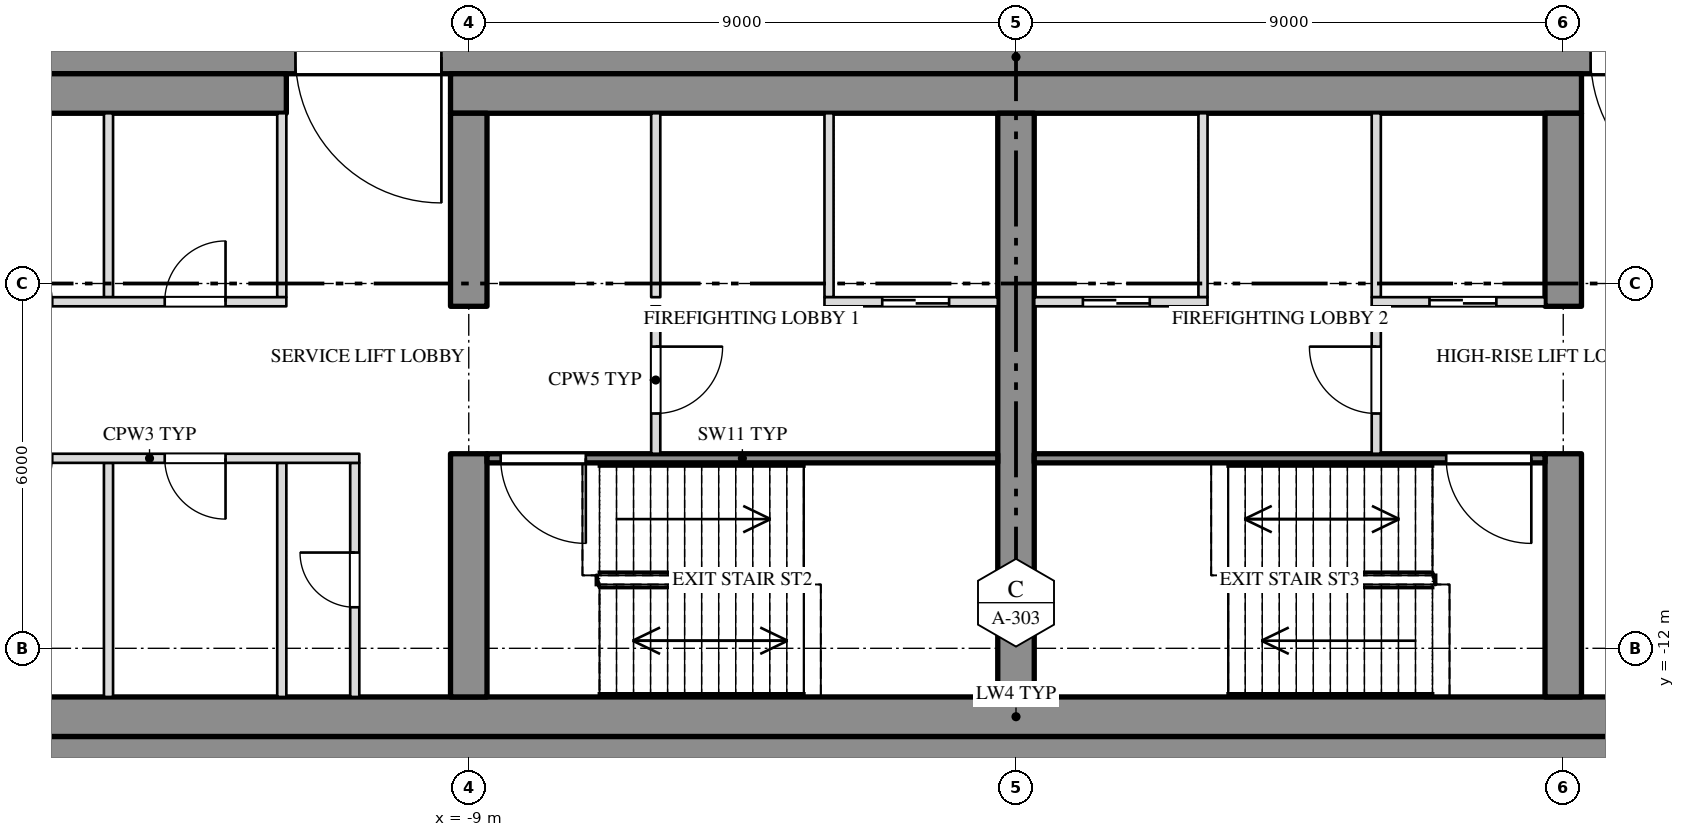
"""IFC4 building model, lengths in metres.
Left out: names, types, materials, properties, quantities, classifications, styles, units other than length and angle.
Written with IfcOpenShell. Run it as: python <this file> out.ifc"""

import sys

from ifc_helpers import new_model, si_unit, direction, frame, frame_2d, origin, place, context, subcontext, project, spatial, rectangle, extrude, element, fill, save


model = new_model("IFC4")
c1 = context("Model", 3, precision=1e-05, world=origin(), true_north=direction((0.0, 1.0)))
c2 = subcontext(c1, "Body", "Model", "MODEL_VIEW")
j1 = project(units=[si_unit("LENGTHUNIT", "METRE"), si_unit("PLANEANGLEUNIT", "RADIAN")], contexts=[c1])
p1 = place(None, origin())
s1 = spatial("IfcSite", under=j1, at=p1, CompositionType="ELEMENT")
p2 = place(p1, origin())
s2 = spatial("IfcBuilding", under=s1, at=p2, CompositionType="ELEMENT")
p3 = place(p2, frame((0.0, 0.0, 272.5)))
s3 = spatial("IfcBuildingStorey", under=s2, at=p3, CompositionType="ELEMENT", Elevation=272.5)
p4 = place(p3, frame((-27.0, -2.275, 0.0), z_axis=(0.0, 0.0, 1.0), x_axis=(1.0, 0.0, 0.0)))
e1 = element("IfcWall", 1, at=p4, inside=s3, PredefinedType="SHEAR", context=c2, shape_type="SweptSolid", body=[
    extrude(rectangle(XDim=54.0, YDim=0.55, at=frame_2d((27.0, 0.0))), origin(), (0.0, 0.0, 1.0), 3.78),
])
p5 = place(p4, frame((15.15, 0.0, 0.0)))
e2 = element("IfcOpeningElement", 2, at=p5, cuts=e1, PredefinedType="OPENING", context=c2, shape_type="SweptSolid", body=[
    extrude(rectangle(XDim=2.4, YDim=2.1, at=frame_2d((1.2, 1.05))), frame((0.0, 0.287, 0.0), z_axis=(0.0, -1.0, 0.0), x_axis=(1.0, 0.0, 0.0)), (0.0, 0.0, 1.0), 0.574),
])
p6 = place(p4, frame((36.45, 0.0, 0.0)))
e3 = element("IfcOpeningElement", 3, at=p6, cuts=e1, PredefinedType="OPENING", context=c2, shape_type="SweptSolid", body=[
    extrude(rectangle(XDim=2.4, YDim=2.1, at=frame_2d((1.2, 1.05))), frame((0.0, 0.287, 0.0), z_axis=(0.0, -1.0, 0.0), x_axis=(1.0, 0.0, 0.0)), (0.0, 0.0, 1.0), 0.574),
])
p7 = place(p3, frame((-27.0, -13.725, 0.0), z_axis=(0.0, 0.0, 1.0), x_axis=(1.0, 0.0, 0.0)))
e4 = element("IfcWall", 4, at=p7, inside=s3, PredefinedType="SHEAR", context=c2, shape_type="SweptSolid", body=[
    extrude(rectangle(XDim=54.0, YDim=0.55, at=frame_2d((27.0, 0.0))), origin(), (0.0, 0.0, 1.0), 3.78),
])
p8 = place(p3, frame((-26.45, -2.875, 0.0), z_axis=(0.0, 0.0, 1.0), x_axis=(1.0, 0.0, 0.0)))
e5 = element("IfcWall", 5, at=p8, inside=s3, PredefinedType="SHEAR", context=c2, shape_type="SweptSolid", body=[
    extrude(rectangle(XDim=14.45, YDim=0.65, at=frame_2d((7.225, 0.0))), origin(), (0.0, 0.0, 1.0), 3.78),
])
p9 = place(p3, frame((-9.3, -2.875, 0.0), z_axis=(0.0, 0.0, 1.0), x_axis=(1.0, 0.0, 0.0)))
e6 = element("IfcWall", 6, at=p9, inside=s3, PredefinedType="SHEAR", context=c2, shape_type="SweptSolid", body=[
    extrude(rectangle(XDim=18.6, YDim=0.65, at=frame_2d((9.3, 0.0))), origin(), (0.0, 0.0, 1.0), 3.78),
])
p10 = place(p3, frame((-26.45, -13.125, 0.0), z_axis=(0.0, 0.0, 1.0), x_axis=(1.0, 0.0, 0.0)))
e7 = element("IfcWall", 7, at=p10, inside=s3, PredefinedType="SHEAR", context=c2, shape_type="SweptSolid", body=[
    extrude(rectangle(XDim=52.9, YDim=0.65, at=frame_2d((26.45, 0.0))), origin(), (0.0, 0.0, 1.0), 3.78),
])
p11 = place(p3, frame((-9.0, -12.8, 0.0), z_axis=(0.0, 0.0, 1.0), x_axis=(0.0, 1.0, 0.0)))
e8 = element("IfcWall", 8, at=p11, inside=s3, PredefinedType="SHEAR", context=c2, shape_type="SweptSolid", body=[
    extrude(rectangle(XDim=4.0, YDim=0.6, at=frame_2d((2.0, 0.0))), origin(), (0.0, 0.0, 1.0), 3.78),
])
p12 = place(p3, frame((-9.0, -6.375, 0.0), z_axis=(0.0, 0.0, 1.0), x_axis=(0.0, 1.0, 0.0)))
e9 = element("IfcWall", 9, at=p12, inside=s3, PredefinedType="SHEAR", context=c2, shape_type="SweptSolid", body=[
    extrude(rectangle(XDim=3.175, YDim=0.6, at=frame_2d((1.587, 0.0))), origin(), (0.0, 0.0, 1.0), 3.78),
])
p13 = place(p3, frame((0.0, -12.8, 0.0), z_axis=(0.0, 0.0, 1.0), x_axis=(0.0, 1.0, 0.0)))
e10 = element("IfcWall", 10, at=p13, inside=s3, PredefinedType="SHEAR", context=c2, shape_type="SweptSolid", body=[
    extrude(rectangle(XDim=9.6, YDim=0.6, at=frame_2d((4.8, 0.0))), origin(), (0.0, 0.0, 1.0), 3.78),
])
p14 = place(p3, frame((9.0, -12.8, 0.0), z_axis=(0.0, 0.0, 1.0), x_axis=(0.0, 1.0, 0.0)))
e11 = element("IfcWall", 11, at=p14, inside=s3, PredefinedType="SHEAR", context=c2, shape_type="SweptSolid", body=[
    extrude(rectangle(XDim=4.0, YDim=0.6, at=frame_2d((2.0, 0.0))), origin(), (0.0, 0.0, 1.0), 3.78),
])
p15 = place(p3, frame((9.0, -6.375, 0.0), z_axis=(0.0, 0.0, 1.0), x_axis=(0.0, 1.0, 0.0)))
e12 = element("IfcWall", 12, at=p15, inside=s3, PredefinedType="SHEAR", context=c2, shape_type="SweptSolid", body=[
    extrude(rectangle(XDim=3.175, YDim=0.6, at=frame_2d((1.587, 0.0))), origin(), (0.0, 0.0, 1.0), 3.78),
])
for number, where, z_axis, x_axis in (
    (13, (-12.075, -6.225, 0.0), (0.0, 0.0, 1.0), (0.0, 1.0, 0.0)),
    (14, (-14.925, -6.225, 0.0), (0.0, 0.0, 1.0), (0.0, 1.0, 0.0)),
    (15, (-3.075, -6.225, 0.0), (0.0, 0.0, 1.0), (0.0, 1.0, 0.0)),
    (16, (-5.925, -6.225, 0.0), (0.0, 0.0, 1.0), (0.0, 1.0, 0.0)),
    (17, (3.075, -6.225, 0.0), (0.0, 0.0, 1.0), (0.0, 1.0, 0.0)),
    (18, (5.925, -6.225, 0.0), (0.0, 0.0, 1.0), (0.0, 1.0, 0.0)),
):
    element("IfcWall", number, at=place(p3, frame(where, z_axis=z_axis, x_axis=x_axis)), inside=s3, PredefinedType="PARTITIONING", context=c2, shape_type="SweptSolid", body=[
        extrude(rectangle(XDim=3.025, YDim=0.15, at=frame_2d((1.513, 0.0))), origin(), (0.0, 0.0, 1.0), 3.78),
    ])
p16 = place(p3, frame((-10.875, -12.8, 0.0), z_axis=(0.0, 0.0, 1.0), x_axis=(0.0, 1.0, 0.0)))
e19 = element("IfcWall", 19, at=p16, inside=s3, PredefinedType="PARTITIONING", context=c2, shape_type="SweptSolid", body=[
    extrude(rectangle(XDim=3.85, YDim=0.15, at=frame_2d((1.925, 0.0))), origin(), (0.0, 0.0, 1.0), 3.78),
])
p17 = place(p16, frame((1.475, 0.0, 0.0)))
e20 = element("IfcOpeningElement", 20, at=p17, cuts=e19, PredefinedType="OPENING", context=c2, shape_type="SweptSolid", body=[
    extrude(rectangle(XDim=0.9, YDim=2.1, at=frame_2d((0.45, 1.05))), frame((0.0, 0.087, 0.0), z_axis=(0.0, -1.0, 0.0), x_axis=(1.0, 0.0, 0.0)), (0.0, 0.0, 1.0), 0.174),
])
for number, where, z_axis, x_axis in (
    (21, (-12.075, -12.8, 0.0), (0.0, 0.0, 1.0), (0.0, 1.0, 0.0)),
    (22, (-14.925, -12.8, 0.0), (0.0, 0.0, 1.0), (0.0, 1.0, 0.0)),
):
    element("IfcWall", number, at=place(p3, frame(where, z_axis=z_axis, x_axis=x_axis)), inside=s3, PredefinedType="PARTITIONING", context=c2, shape_type="SweptSolid", body=[
        extrude(rectangle(XDim=3.85, YDim=0.15, at=frame_2d((1.925, 0.0))), origin(), (0.0, 0.0, 1.0), 3.78),
    ])
p18 = place(p3, frame((-5.925, -8.8, 0.0), z_axis=(0.0, 0.0, 1.0), x_axis=(0.0, 1.0, 0.0)))
e23 = element("IfcWall", 23, at=p18, inside=s3, PredefinedType="PARTITIONING", context=c2, shape_type="SweptSolid", body=[
    extrude(rectangle(XDim=2.425, YDim=0.15, at=frame_2d((1.212, 0.0))), origin(), (0.0, 0.0, 1.0), 3.78),
])
p19 = place(p18, frame((0.662, 0.0, 0.0)))
e24 = element("IfcOpeningElement", 24, at=p19, cuts=e23, PredefinedType="OPENING", context=c2, shape_type="SweptSolid", body=[
    extrude(rectangle(XDim=1.1, YDim=2.1, at=frame_2d((0.55, 1.05))), frame((0.0, 0.087, 0.0), z_axis=(0.0, -1.0, 0.0), x_axis=(1.0, 0.0, 0.0)), (0.0, 0.0, 1.0), 0.174),
])
p20 = place(p3, frame((5.925, -8.8, 0.0), z_axis=(0.0, 0.0, 1.0), x_axis=(0.0, 1.0, 0.0)))
e25 = element("IfcWall", 25, at=p20, inside=s3, PredefinedType="PARTITIONING", context=c2, shape_type="SweptSolid", body=[
    extrude(rectangle(XDim=2.425, YDim=0.15, at=frame_2d((1.212, 0.0))), origin(), (0.0, 0.0, 1.0), 3.78),
])
p21 = place(p20, frame((0.662, 0.0, 0.0)))
e26 = element("IfcOpeningElement", 26, at=p21, cuts=e25, PredefinedType="OPENING", context=c2, shape_type="SweptSolid", body=[
    extrude(rectangle(XDim=1.1, YDim=2.1, at=frame_2d((0.55, 1.05))), frame((0.0, 0.087, 0.0), z_axis=(0.0, -1.0, 0.0), x_axis=(1.0, 0.0, 0.0)), (0.0, 0.0, 1.0), 0.174),
])
p22 = place(p3, frame((-17.7, -6.3, 0.0), z_axis=(0.0, 0.0, 1.0), x_axis=(1.0, 0.0, 0.0)))
e27 = element("IfcWall", 27, at=p22, inside=s3, PredefinedType="PARTITIONING", context=c2, shape_type="SweptSolid", body=[
    extrude(rectangle(XDim=5.7, YDim=0.15, at=frame_2d((2.85, 0.0))), origin(), (0.0, 0.0, 1.0), 3.78),
])
p23 = place(p22, frame((0.85, 0.0, 0.0)))
e28 = element("IfcOpeningElement", 28, at=p23, cuts=e27, PredefinedType="OPENING", context=c2, shape_type="SweptSolid", body=[
    extrude(rectangle(XDim=1.0, YDim=2.1, at=frame_2d((0.5, 1.05))), frame((0.0, 0.087, 0.0), z_axis=(0.0, -1.0, 0.0), x_axis=(1.0, 0.0, 0.0)), (0.0, 0.0, 1.0), 0.174),
])
p24 = place(p22, frame((3.7, 0.0, 0.0)))
e29 = element("IfcOpeningElement", 29, at=p24, cuts=e27, PredefinedType="OPENING", context=c2, shape_type="SweptSolid", body=[
    extrude(rectangle(XDim=1.0, YDim=2.1, at=frame_2d((0.5, 1.05))), frame((0.0, 0.087, 0.0), z_axis=(0.0, -1.0, 0.0), x_axis=(1.0, 0.0, 0.0)), (0.0, 0.0, 1.0), 0.174),
])
p25 = place(p3, frame((-3.15, -6.3, 0.0), z_axis=(0.0, 0.0, 1.0), x_axis=(1.0, 0.0, 0.0)))
e30 = element("IfcWall", 30, at=p25, inside=s3, PredefinedType="PARTITIONING", context=c2, shape_type="SweptSolid", body=[
    extrude(rectangle(XDim=2.85, YDim=0.15, at=frame_2d((1.425, 0.0))), origin(), (0.0, 0.0, 1.0), 3.78),
])
p26 = place(p25, frame((0.95, 0.0, 0.0)))
e31 = element("IfcOpeningElement", 31, at=p26, cuts=e30, PredefinedType="OPENING", context=c2, shape_type="SweptSolid", body=[
    extrude(rectangle(XDim=1.1, YDim=2.1, at=frame_2d((0.55, 1.05))), frame((0.0, 0.087, 0.0), z_axis=(0.0, -1.0, 0.0), x_axis=(1.0, 0.0, 0.0)), (0.0, 0.0, 1.0), 0.174),
])
p27 = place(p3, frame((0.3, -6.3, 0.0), z_axis=(0.0, 0.0, 1.0), x_axis=(1.0, 0.0, 0.0)))
e32 = element("IfcWall", 32, at=p27, inside=s3, PredefinedType="PARTITIONING", context=c2, shape_type="SweptSolid", body=[
    extrude(rectangle(XDim=2.85, YDim=0.15, at=frame_2d((1.425, 0.0))), origin(), (0.0, 0.0, 1.0), 3.78),
])
p28 = place(p27, frame((0.8, 0.0, 0.0)))
e33 = element("IfcOpeningElement", 33, at=p28, cuts=e32, PredefinedType="OPENING", context=c2, shape_type="SweptSolid", body=[
    extrude(rectangle(XDim=1.1, YDim=2.1, at=frame_2d((0.55, 1.05))), frame((0.0, 0.087, 0.0), z_axis=(0.0, -1.0, 0.0), x_axis=(1.0, 0.0, 0.0)), (0.0, 0.0, 1.0), 0.174),
])
p29 = place(p3, frame((5.85, -6.3, 0.0), z_axis=(0.0, 0.0, 1.0), x_axis=(1.0, 0.0, 0.0)))
e34 = element("IfcWall", 34, at=p29, inside=s3, PredefinedType="PARTITIONING", context=c2, shape_type="SweptSolid", body=[
    extrude(rectangle(XDim=2.85, YDim=0.15, at=frame_2d((1.425, 0.0))), origin(), (0.0, 0.0, 1.0), 3.78),
])
p30 = place(p29, frame((0.95, 0.0, 0.0)))
e35 = element("IfcOpeningElement", 35, at=p30, cuts=e34, PredefinedType="OPENING", context=c2, shape_type="SweptSolid", body=[
    extrude(rectangle(XDim=1.1, YDim=2.1, at=frame_2d((0.55, 1.05))), frame((0.0, 0.087, 0.0), z_axis=(0.0, -1.0, 0.0), x_axis=(1.0, 0.0, 0.0)), (0.0, 0.0, 1.0), 0.174),
])
p31 = place(p3, frame((-17.7, -8.875, 0.0), z_axis=(0.0, 0.0, 1.0), x_axis=(1.0, 0.0, 0.0)))
e36 = element("IfcWall", 36, at=p31, inside=s3, PredefinedType="PARTITIONING", context=c2, shape_type="SweptSolid", body=[
    extrude(rectangle(XDim=6.9, YDim=0.15, at=frame_2d((3.45, 0.0))), origin(), (0.0, 0.0, 1.0), 3.78),
])
p32 = place(p31, frame((0.85, 0.0, 0.0)))
e37 = element("IfcOpeningElement", 37, at=p32, cuts=e36, PredefinedType="OPENING", context=c2, shape_type="SweptSolid", body=[
    extrude(rectangle(XDim=1.0, YDim=2.1, at=frame_2d((0.5, 1.05))), frame((0.0, 0.087, 0.0), z_axis=(0.0, -1.0, 0.0), x_axis=(1.0, 0.0, 0.0)), (0.0, 0.0, 1.0), 0.174),
])
p33 = place(p31, frame((3.7, 0.0, 0.0)))
e38 = element("IfcOpeningElement", 38, at=p33, cuts=e36, PredefinedType="OPENING", context=c2, shape_type="SweptSolid", body=[
    extrude(rectangle(XDim=1.0, YDim=2.1, at=frame_2d((0.5, 1.05))), frame((0.0, 0.087, 0.0), z_axis=(0.0, -1.0, 0.0), x_axis=(1.0, 0.0, 0.0)), (0.0, 0.0, 1.0), 0.174),
])
p34 = place(p3, frame((-8.7, -8.875, 0.0), z_axis=(0.0, 0.0, 1.0), x_axis=(1.0, 0.0, 0.0)))
e39 = element("IfcWall", 39, at=p34, inside=s3, PredefinedType="SHEAR", context=c2, shape_type="SweptSolid", body=[
    extrude(rectangle(XDim=8.4, YDim=0.15, at=frame_2d((4.2, 0.0))), origin(), (0.0, 0.0, 1.0), 3.78),
])
p35 = place(p34, frame((0.225, 0.0, 0.0)))
e40 = element("IfcOpeningElement", 40, at=p35, cuts=e39, PredefinedType="OPENING", context=c2, shape_type="SweptSolid", body=[
    extrude(rectangle(XDim=1.4, YDim=2.1, at=frame_2d((0.7, 1.05))), frame((0.0, 0.087, 0.0), z_axis=(0.0, -1.0, 0.0), x_axis=(1.0, 0.0, 0.0)), (0.0, 0.0, 1.0), 0.174),
])
p36 = place(p3, frame((0.3, -8.875, 0.0), z_axis=(0.0, 0.0, 1.0), x_axis=(1.0, 0.0, 0.0)))
e41 = element("IfcWall", 41, at=p36, inside=s3, PredefinedType="SHEAR", context=c2, shape_type="SweptSolid", body=[
    extrude(rectangle(XDim=8.4, YDim=0.15, at=frame_2d((4.2, 0.0))), origin(), (0.0, 0.0, 1.0), 3.78),
])
p37 = place(p36, frame((6.775, 0.0, 0.0)))
e42 = element("IfcOpeningElement", 42, at=p37, cuts=e41, PredefinedType="OPENING", context=c2, shape_type="SweptSolid", body=[
    extrude(rectangle(XDim=1.4, YDim=2.1, at=frame_2d((0.7, 1.05))), frame((0.0, 0.087, 0.0), z_axis=(0.0, -1.0, 0.0), x_axis=(1.0, 0.0, 0.0)), (0.0, 0.0, 1.0), 0.174),
])
p38 = place(p32, origin())
e43 = element("IfcDoor", 43, at=p38, inside=s3, OperationType="SINGLE_SWING_RIGHT", PredefinedType="DOOR", context=c2, shape_type="SweptSolid", body=[
    extrude(rectangle(XDim=1.0, YDim=2.1, at=frame_2d((0.5, 1.05))), frame((0.0, 0.025, 0.0), z_axis=(0.0, -1.0, 0.0), x_axis=(1.0, 0.0, 0.0)), (0.0, 0.0, 1.0), 0.05),
])
fill(e37, e43)
p39 = place(p23, origin())
e44 = element("IfcDoor", 44, at=p39, inside=s3, OperationType="SINGLE_SWING_LEFT", PredefinedType="DOOR", context=c2, shape_type="SweptSolid", body=[
    extrude(rectangle(XDim=1.0, YDim=2.1, at=frame_2d((0.5, 1.05))), frame((0.0, 0.025, 0.0), z_axis=(0.0, -1.0, 0.0), x_axis=(1.0, 0.0, 0.0)), (0.0, 0.0, 1.0), 0.05),
])
fill(e28, e44)
p40 = place(p33, origin())
e45 = element("IfcDoor", 45, at=p40, inside=s3, OperationType="SINGLE_SWING_LEFT", PredefinedType="DOOR", context=c2, shape_type="SweptSolid", body=[
    extrude(rectangle(XDim=1.0, YDim=2.1, at=frame_2d((0.5, 1.05))), frame((0.0, 0.025, 0.0), z_axis=(0.0, -1.0, 0.0), x_axis=(1.0, 0.0, 0.0)), (0.0, 0.0, 1.0), 0.05),
])
fill(e38, e45)
p41 = place(p24, origin())
e46 = element("IfcDoor", 46, at=p41, inside=s3, OperationType="SINGLE_SWING_RIGHT", PredefinedType="DOOR", context=c2, shape_type="SweptSolid", body=[
    extrude(rectangle(XDim=1.0, YDim=2.1, at=frame_2d((0.5, 1.05))), frame((0.0, 0.025, 0.0), z_axis=(0.0, -1.0, 0.0), x_axis=(1.0, 0.0, 0.0)), (0.0, 0.0, 1.0), 0.05),
])
fill(e29, e46)
p42 = place(p17, origin())
e47 = element("IfcDoor", 47, at=p42, inside=s3, OperationType="SINGLE_SWING_RIGHT", PredefinedType="DOOR", context=c2, shape_type="SweptSolid", body=[
    extrude(rectangle(XDim=0.9, YDim=2.1, at=frame_2d((0.45, 1.05))), frame((0.0, 0.025, 0.0), z_axis=(0.0, -1.0, 0.0), x_axis=(1.0, 0.0, 0.0)), (0.0, 0.0, 1.0), 0.05),
])
fill(e20, e47)
p43 = place(p5, origin())
e48 = element("IfcDoor", 48, at=p43, inside=s3, OperationType="DOUBLE_DOOR_SINGLE_SWING", PredefinedType="DOOR", context=c2, shape_type="SweptSolid", body=[
    extrude(rectangle(XDim=2.4, YDim=2.1, at=frame_2d((1.2, 1.05))), frame((0.0, 0.025, 0.0), z_axis=(0.0, -1.0, 0.0), x_axis=(1.0, 0.0, 0.0)), (0.0, 0.0, 1.0), 0.05),
])
fill(e2, e48)
p44 = place(p35, origin())
e49 = element("IfcDoor", 49, at=p44, inside=s3, OperationType="DOUBLE_DOOR_SINGLE_SWING", PredefinedType="DOOR", context=c2, shape_type="SweptSolid", body=[
    extrude(rectangle(XDim=1.4, YDim=2.1, at=frame_2d((0.7, 1.05))), frame((0.0, 0.025, 0.0), z_axis=(0.0, -1.0, 0.0), x_axis=(1.0, 0.0, 0.0)), (0.0, 0.0, 1.0), 0.05),
])
fill(e40, e49)
p45 = place(p19, origin())
e50 = element("IfcDoor", 50, at=p45, inside=s3, OperationType="SINGLE_SWING_LEFT", PredefinedType="DOOR", context=c2, shape_type="SweptSolid", body=[
    extrude(rectangle(XDim=1.1, YDim=2.1, at=frame_2d((0.55, 1.05))), frame((0.0, 0.025, 0.0), z_axis=(0.0, -1.0, 0.0), x_axis=(1.0, 0.0, 0.0)), (0.0, 0.0, 1.0), 0.05),
])
fill(e24, e50)
p46 = place(p26, origin())
e51 = element("IfcDoor", 51, at=p46, inside=s3, OperationType="SLIDING_TO_LEFT", PredefinedType="DOOR", context=c2, shape_type="SweptSolid", body=[
    extrude(rectangle(XDim=1.1, YDim=2.1, at=frame_2d((0.55, 1.05))), frame((0.0, 0.025, 0.0), z_axis=(0.0, -1.0, 0.0), x_axis=(1.0, 0.0, 0.0)), (0.0, 0.0, 1.0), 0.05),
])
fill(e31, e51)
p47 = place(p28, origin())
e52 = element("IfcDoor", 52, at=p47, inside=s3, OperationType="SLIDING_TO_RIGHT", PredefinedType="DOOR", context=c2, shape_type="SweptSolid", body=[
    extrude(rectangle(XDim=1.1, YDim=2.1, at=frame_2d((0.55, 1.05))), frame((0.0, 0.025, 0.0), z_axis=(0.0, -1.0, 0.0), x_axis=(1.0, 0.0, 0.0)), (0.0, 0.0, 1.0), 0.05),
])
fill(e33, e52)
p48 = place(p21, origin())
e53 = element("IfcDoor", 53, at=p48, inside=s3, OperationType="SINGLE_SWING_RIGHT", PredefinedType="DOOR", context=c2, shape_type="SweptSolid", body=[
    extrude(rectangle(XDim=1.1, YDim=2.1, at=frame_2d((0.55, 1.05))), frame((0.0, 0.025, 0.0), z_axis=(0.0, -1.0, 0.0), x_axis=(1.0, 0.0, 0.0)), (0.0, 0.0, 1.0), 0.05),
])
fill(e26, e53)
p49 = place(p30, origin())
e54 = element("IfcDoor", 54, at=p49, inside=s3, OperationType="SLIDING_TO_RIGHT", PredefinedType="DOOR", context=c2, shape_type="SweptSolid", body=[
    extrude(rectangle(XDim=1.1, YDim=2.1, at=frame_2d((0.55, 1.05))), frame((0.0, 0.025, 0.0), z_axis=(0.0, -1.0, 0.0), x_axis=(1.0, 0.0, 0.0)), (0.0, 0.0, 1.0), 0.05),
])
fill(e35, e54)
p50 = place(p37, origin())
e55 = element("IfcDoor", 55, at=p50, inside=s3, OperationType="DOUBLE_DOOR_SINGLE_SWING", PredefinedType="DOOR", context=c2, shape_type="SweptSolid", body=[
    extrude(rectangle(XDim=1.4, YDim=2.1, at=frame_2d((0.7, 1.05))), frame((0.0, 0.025, 0.0), z_axis=(0.0, -1.0, 0.0), x_axis=(1.0, 0.0, 0.0)), (0.0, 0.0, 1.0), 0.05),
])
fill(e42, e55)
p51 = place(p6, origin())
e56 = element("IfcDoor", 56, at=p51, inside=s3, OperationType="DOUBLE_DOOR_SINGLE_SWING", PredefinedType="DOOR", context=c2, shape_type="SweptSolid", body=[
    extrude(rectangle(XDim=2.4, YDim=2.1, at=frame_2d((1.2, 1.05))), frame((0.0, 0.025, 0.0), z_axis=(0.0, -1.0, 0.0), x_axis=(1.0, 0.0, 0.0)), (0.0, 0.0, 1.0), 0.05),
])
fill(e3, e56)
save(model, sys.argv[1])
